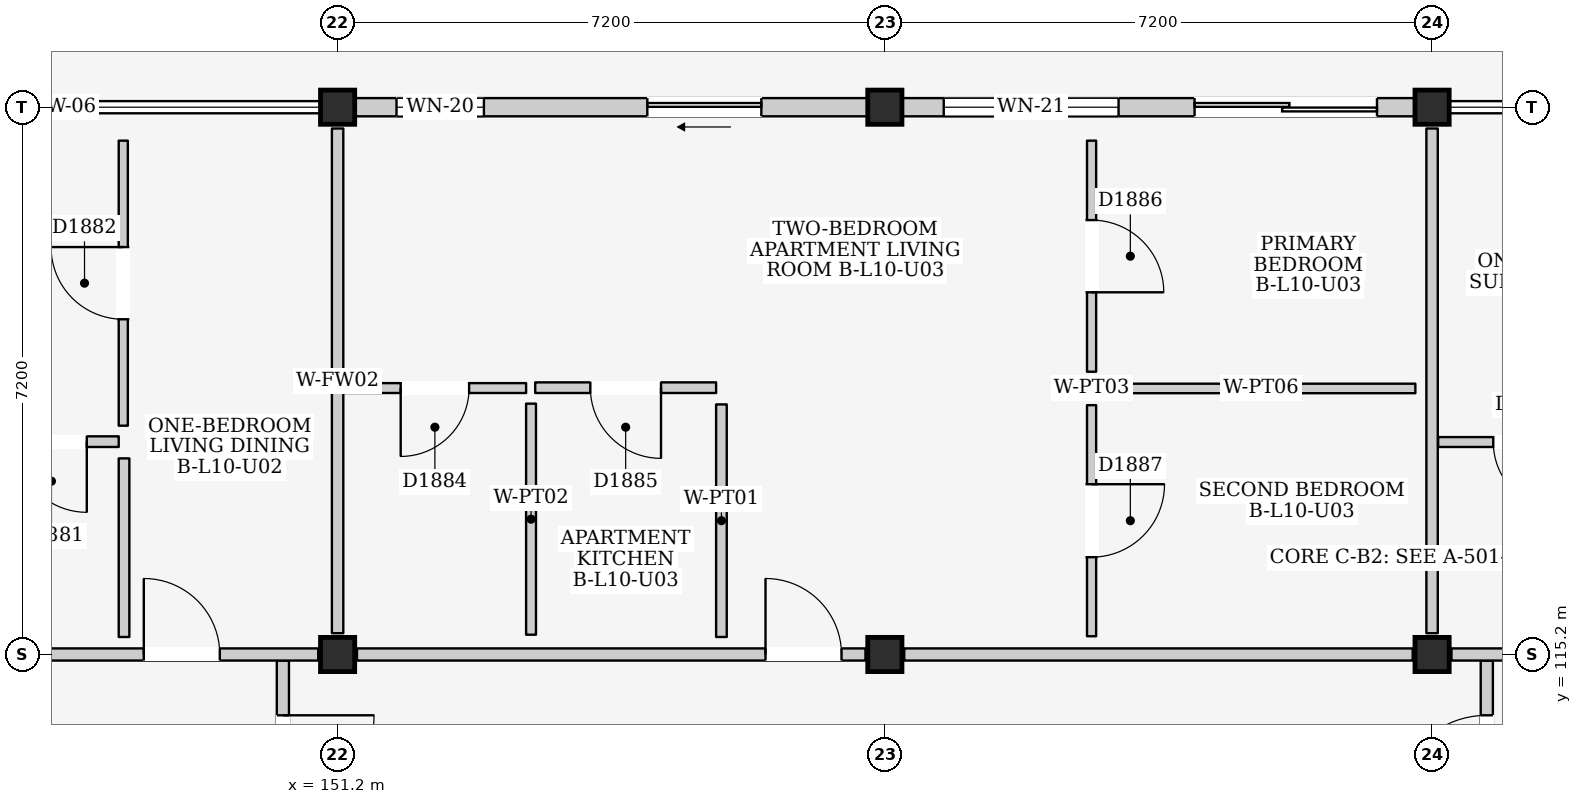
"""IFC4 building model, lengths in metres.
Left out: names, types, materials, properties, quantities, classifications, styles, units other than length and angle.
Written with IfcOpenShell. Run it as: python <this file> out.ifc"""

import sys

from ifc_helpers import new_model, si_unit, direction, frame, frame_2d, origin, origin_2d, place, context, subcontext, project, spatial, rectangle, extrude, element, fill, save


model = new_model("IFC4")
c1 = context("Model", 3, precision=1e-05, world=origin(), true_north=direction((0.0, 1.0)))
c2 = subcontext(c1, "Body", "Model", "MODEL_VIEW")
j1 = project(units=[si_unit("LENGTHUNIT", "METRE"), si_unit("PLANEANGLEUNIT", "RADIAN")], contexts=[c1])
p1 = place(None, origin())
s1 = spatial("IfcSite", under=j1, at=p1, CompositionType="ELEMENT")
p2 = place(p1, origin())
s2 = spatial("IfcBuilding", under=s1, at=p2, CompositionType="ELEMENT")
p3 = place(p2, frame((0.0, 0.0, 34.8)))
s3 = spatial("IfcBuildingStorey", under=s2, at=p3, CompositionType="ELEMENT", Elevation=34.8)
for number, where, z_axis, x_axis in (
    (1, (151.2, 115.2, 0.0), (0.0, 0.0, 1.0), (1.0, 0.0, 0.0)),
    (2, (151.2, 122.4, 0.0), (0.0, 0.0, 1.0), (1.0, 0.0, 0.0)),
    (3, (158.4, 115.2, 0.0), (0.0, 0.0, 1.0), (1.0, 0.0, 0.0)),
    (4, (158.4, 122.4, 0.0), (0.0, 0.0, 1.0), (1.0, 0.0, 0.0)),
    (5, (165.6, 115.2, 0.0), (0.0, 0.0, 1.0), (1.0, 0.0, 0.0)),
    (6, (165.6, 122.4, 0.0), (0.0, 0.0, 1.0), (1.0, 0.0, 0.0)),
):
    element("IfcColumn", number, at=place(p3, frame(where, z_axis=z_axis, x_axis=x_axis)), inside=s3, PredefinedType="COLUMN", context=c2, shape_type="SweptSolid", body=[
        extrude(rectangle(XDim=0.45, YDim=0.45, at=origin_2d()), origin(), (0.0, 0.0, 1.0), 3.2),
    ])
p4 = place(p3, frame((151.425, 122.4, 0.0), z_axis=(0.0, 0.0, 1.0), x_axis=(1.0, 0.0, 0.0)))
e7 = element("IfcWall", 7, at=p4, inside=s3, PredefinedType="ELEMENTEDWALL", context=c2, shape_type="SweptSolid", body=[
    extrude(rectangle(XDim=6.75, YDim=0.24, at=frame_2d((3.375, 0.0))), origin(), (0.0, 0.0, 1.0), 2.495),
])
p5 = place(p4, frame((3.85, 0.0, 0.0)))
e8 = element("IfcOpeningElement", 8, at=p5, cuts=e7, PredefinedType="OPENING", context=c2, shape_type="SweptSolid", body=[
    extrude(rectangle(XDim=1.5, YDim=2.12, at=frame_2d((0.75, 1.06))), frame((0.0, 0.135, 0.0), z_axis=(0.0, -1.0, 0.0), x_axis=(1.0, 0.0, 0.0)), (0.0, 0.0, 1.0), 0.27),
])
p6 = place(p4, frame((0.55, 0.0, 0.9)))
e9 = element("IfcOpeningElement", 9, at=p6, cuts=e7, PredefinedType="OPENING", context=c2, shape_type="SweptSolid", body=[
    extrude(rectangle(XDim=1.15, YDim=1.15, at=frame_2d((0.575, 0.575))), frame((0.0, 0.135, 0.0), z_axis=(0.0, -1.0, 0.0), x_axis=(1.0, 0.0, 0.0)), (0.0, 0.0, 1.0), 0.27),
])
p7 = place(p3, frame((158.625, 122.4, 0.0), z_axis=(0.0, 0.0, 1.0), x_axis=(1.0, 0.0, 0.0)))
e10 = element("IfcWall", 10, at=p7, inside=s3, PredefinedType="ELEMENTEDWALL", context=c2, shape_type="SweptSolid", body=[
    extrude(rectangle(XDim=6.75, YDim=0.24, at=frame_2d((3.375, 0.0))), origin(), (0.0, 0.0, 1.0), 2.495),
])
p8 = place(p7, frame((3.85, 0.0, 0.0)))
e11 = element("IfcOpeningElement", 11, at=p8, cuts=e10, PredefinedType="OPENING", context=c2, shape_type="SweptSolid", body=[
    extrude(rectangle(XDim=2.4, YDim=2.12, at=frame_2d((1.2, 1.06))), frame((0.0, 0.135, 0.0), z_axis=(0.0, -1.0, 0.0), x_axis=(1.0, 0.0, 0.0)), (0.0, 0.0, 1.0), 0.27),
])
p9 = place(p7, frame((0.55, 0.0, 0.785)))
e12 = element("IfcOpeningElement", 12, at=p9, cuts=e10, PredefinedType="OPENING", context=c2, shape_type="SweptSolid", body=[
    extrude(rectangle(XDim=2.3, YDim=1.6, at=frame_2d((1.15, 0.8))), frame((0.0, 0.135, 0.0), z_axis=(0.0, -1.0, 0.0), x_axis=(1.0, 0.0, 0.0)), (0.0, 0.0, 1.0), 0.27),
])
p10 = place(p3, frame((150.48, 111.1, 0.0), z_axis=(0.0, 0.0, 1.0), x_axis=(0.0, 1.0, 0.0)))
e13 = element("IfcWall", 13, at=p10, inside=s3, PredefinedType="PARTITIONING", context=c2, shape_type="SweptSolid", body=[
    extrude(rectangle(XDim=4.02, YDim=0.16, at=frame_2d((2.01, 0.0))), origin(), (0.0, 0.0, 1.0), 2.96),
])
p11 = place(p10, frame((2.1, 0.0, 0.0)))
e14 = element("IfcOpeningElement", 14, at=p11, cuts=e13, PredefinedType="OPENING", context=c2, shape_type="SweptSolid", body=[
    extrude(rectangle(XDim=1.2, YDim=2.2, at=frame_2d((0.6, 1.1))), frame((0.0, 0.095, 0.0), z_axis=(0.0, -1.0, 0.0), x_axis=(1.0, 0.0, 0.0)), (0.0, 0.0, 1.0), 0.19),
])
p12 = place(p3, frame((166.32, 110.8, 0.0), z_axis=(0.0, 0.0, 1.0), x_axis=(0.0, 1.0, 0.0)))
e15 = element("IfcWall", 15, at=p12, inside=s3, PredefinedType="PARTITIONING", context=c2, shape_type="SweptSolid", body=[
    extrude(rectangle(XDim=4.32, YDim=0.16, at=frame_2d((2.16, 0.0))), origin(), (0.0, 0.0, 1.0), 2.96),
])
p13 = place(p12, frame((2.4, 0.0, 0.0)))
e16 = element("IfcOpeningElement", 16, at=p13, cuts=e15, PredefinedType="OPENING", context=c2, shape_type="SweptSolid", body=[
    extrude(rectangle(XDim=1.2, YDim=2.2, at=frame_2d((0.6, 1.1))), frame((0.0, 0.095, 0.0), z_axis=(0.0, -1.0, 0.0), x_axis=(1.0, 0.0, 0.0)), (0.0, 0.0, 1.0), 0.19),
])
p14 = place(p3, frame((144.255, 115.2, 0.0), z_axis=(0.0, 0.0, 1.0), x_axis=(1.0, 0.0, 0.0)))
e17 = element("IfcWall", 17, at=p14, inside=s3, PredefinedType="PARTITIONING", context=c2, shape_type="SweptSolid", body=[
    extrude(rectangle(XDim=6.69, YDim=0.16, at=frame_2d((3.345, 0.0))), origin(), (0.0, 0.0, 1.0), 2.345),
])
p15 = place(p14, frame((4.395, 0.0, 0.0)))
e18 = element("IfcOpeningElement", 18, at=p15, cuts=e17, PredefinedType="OPENING", context=c2, shape_type="SweptSolid", body=[
    extrude(rectangle(XDim=1.0, YDim=2.15, at=frame_2d((0.5, 1.075))), frame((0.0, 0.095, 0.0), z_axis=(0.0, -1.0, 0.0), x_axis=(1.0, 0.0, 0.0)), (0.0, 0.0, 1.0), 0.19),
])
p16 = place(p3, frame((151.2, 115.48, 0.0), z_axis=(0.0, 0.0, 1.0), x_axis=(0.0, 1.0, 0.0)))
e19 = element("IfcWall", 19, at=p16, inside=s3, PredefinedType="PARTITIONING", context=c2, shape_type="SweptSolid", body=[
    extrude(rectangle(XDim=6.64, YDim=0.15, at=frame_2d((3.32, 0.0))), origin(), (0.0, 0.0, 1.0), 2.445),
])
p17 = place(p3, frame((146.55, 118.0, 0.0), z_axis=(0.0, 0.0, 1.0), x_axis=(1.0, 0.0, 0.0)))
e20 = element("IfcWall", 20, at=p17, inside=s3, PredefinedType="PARTITIONING", context=c2, shape_type="SweptSolid", body=[
    extrude(rectangle(XDim=1.77, YDim=0.14, at=frame_2d((0.885, 0.0))), origin(), (0.0, 0.0, 1.0), 2.96),
])
p18 = place(p17, frame((0.42, 0.0, 0.0)))
e21 = element("IfcOpeningElement", 21, at=p18, cuts=e20, PredefinedType="OPENING", context=c2, shape_type="SweptSolid", body=[
    extrude(rectangle(XDim=0.93, YDim=2.14, at=frame_2d((0.465, 1.07))), frame((0.0, 0.085, 0.0), z_axis=(0.0, -1.0, 0.0), x_axis=(1.0, 0.0, 0.0)), (0.0, 0.0, 1.0), 0.17),
])
p19 = place(p3, frame((148.39, 115.43, 0.0), z_axis=(0.0, 0.0, 1.0), x_axis=(0.0, 1.0, 0.0)))
e22 = element("IfcWall", 22, at=p19, inside=s3, PredefinedType="PARTITIONING", context=c2, shape_type="SweptSolid", body=[
    extrude(rectangle(XDim=2.35, YDim=0.14, at=frame_2d((1.175, 0.0))), origin(), (0.0, 0.0, 1.0), 2.96),
])
p20 = place(p3, frame((148.38, 118.21, 0.0), z_axis=(0.0, 0.0, 1.0), x_axis=(0.0, 1.0, 0.0)))
e23 = element("IfcWall", 23, at=p20, inside=s3, PredefinedType="PARTITIONING", context=c2, shape_type="SweptSolid", body=[
    extrude(rectangle(XDim=3.75, YDim=0.12, at=frame_2d((1.875, 0.0))), origin(), (0.0, 0.0, 1.0), 2.96),
])
p21 = place(p20, frame((1.4, 0.0, 0.0)))
e24 = element("IfcOpeningElement", 24, at=p21, cuts=e23, PredefinedType="OPENING", context=c2, shape_type="SweptSolid", body=[
    extrude(rectangle(XDim=0.95, YDim=2.15, at=frame_2d((0.475, 1.075))), frame((0.0, 0.075, 0.0), z_axis=(0.0, -1.0, 0.0), x_axis=(1.0, 0.0, 0.0)), (0.0, 0.0, 1.0), 0.15),
])
p22 = place(p3, frame((151.455, 115.2, 0.0), z_axis=(0.0, 0.0, 1.0), x_axis=(1.0, 0.0, 0.0)))
e25 = element("IfcWall", 25, at=p22, inside=s3, PredefinedType="PARTITIONING", context=c2, shape_type="SweptSolid", body=[
    extrude(rectangle(XDim=6.69, YDim=0.16, at=frame_2d((3.345, 0.0))), origin(), (0.0, 0.0, 1.0), 2.345),
])
p23 = place(p22, frame((5.375, 0.0, 0.0)))
e26 = element("IfcOpeningElement", 26, at=p23, cuts=e25, PredefinedType="OPENING", context=c2, shape_type="SweptSolid", body=[
    extrude(rectangle(XDim=1.0, YDim=2.15, at=frame_2d((0.5, 1.075))), frame((0.0, 0.095, 0.0), z_axis=(0.0, -1.0, 0.0), x_axis=(1.0, 0.0, 0.0)), (0.0, 0.0, 1.0), 0.19),
])
p24 = place(p3, frame((158.655, 115.2, 0.0), z_axis=(0.0, 0.0, 1.0), x_axis=(1.0, 0.0, 0.0)))
e27 = element("IfcWall", 27, at=p24, inside=s3, PredefinedType="PARTITIONING", context=c2, shape_type="SweptSolid", body=[
    extrude(rectangle(XDim=6.69, YDim=0.16, at=frame_2d((3.345, 0.0))), origin(), (0.0, 0.0, 1.0), 2.345),
])
p25 = place(p3, frame((165.6, 115.48, 0.0), z_axis=(0.0, 0.0, 1.0), x_axis=(0.0, 1.0, 0.0)))
e28 = element("IfcWall", 28, at=p25, inside=s3, PredefinedType="PARTITIONING", context=c2, shape_type="SweptSolid", body=[
    extrude(rectangle(XDim=6.64, YDim=0.15, at=frame_2d((3.32, 0.0))), origin(), (0.0, 0.0, 1.0), 2.445),
])
p26 = place(p3, frame((151.28, 118.705, 0.0), z_axis=(0.0, 0.0, 1.0), x_axis=(1.0, 0.0, 0.0)))
e29 = element("IfcWall", 29, at=p26, inside=s3, PredefinedType="PARTITIONING", context=c2, shape_type="SweptSolid", body=[
    extrude(rectangle(XDim=2.4, YDim=0.13, at=frame_2d((1.2, 0.0))), origin(), (0.0, 0.0, 1.0), 2.96),
])
p27 = place(p26, frame((0.75, 0.0, 0.0)))
e30 = element("IfcOpeningElement", 30, at=p27, cuts=e29, PredefinedType="OPENING", context=c2, shape_type="SweptSolid", body=[
    extrude(rectangle(XDim=0.9, YDim=2.1, at=frame_2d((0.45, 1.05))), frame((0.0, 0.08, 0.0), z_axis=(0.0, -1.0, 0.0), x_axis=(1.0, 0.0, 0.0)), (0.0, 0.0, 1.0), 0.16),
])
p28 = place(p3, frame((153.745, 115.46, 0.0), z_axis=(0.0, 0.0, 1.0), x_axis=(0.0, 1.0, 0.0)))
e31 = element("IfcWall", 31, at=p28, inside=s3, PredefinedType="PARTITIONING", context=c2, shape_type="SweptSolid", body=[
    extrude(rectangle(XDim=3.04, YDim=0.13, at=frame_2d((1.52, 0.0))), origin(), (0.0, 0.0, 1.0), 2.96),
])
p29 = place(p3, frame((153.8, 118.71, 0.0), z_axis=(0.0, 0.0, 1.0), x_axis=(1.0, 0.0, 0.0)))
e32 = element("IfcWall", 32, at=p29, inside=s3, PredefinedType="PARTITIONING", context=c2, shape_type="SweptSolid", body=[
    extrude(rectangle(XDim=2.38, YDim=0.14, at=frame_2d((1.19, 0.0))), origin(), (0.0, 0.0, 1.0), 2.96),
])
p30 = place(p29, frame((0.725, 0.0, 0.0)))
e33 = element("IfcOpeningElement", 33, at=p30, cuts=e32, PredefinedType="OPENING", context=c2, shape_type="SweptSolid", body=[
    extrude(rectangle(XDim=0.93, YDim=2.14, at=frame_2d((0.465, 1.07))), frame((0.0, 0.085, 0.0), z_axis=(0.0, -1.0, 0.0), x_axis=(1.0, 0.0, 0.0)), (0.0, 0.0, 1.0), 0.17),
])
p31 = place(p3, frame((156.25, 115.43, 0.0), z_axis=(0.0, 0.0, 1.0), x_axis=(0.0, 1.0, 0.0)))
e34 = element("IfcWall", 34, at=p31, inside=s3, PredefinedType="PARTITIONING", context=c2, shape_type="SweptSolid", body=[
    extrude(rectangle(XDim=3.06, YDim=0.14, at=frame_2d((1.53, 0.0))), origin(), (0.0, 0.0, 1.0), 2.96),
])
p32 = place(p3, frame((161.12, 118.92, 0.0), z_axis=(0.0, 0.0, 1.0), x_axis=(0.0, 1.0, 0.0)))
e35 = element("IfcWall", 35, at=p32, inside=s3, PredefinedType="PARTITIONING", context=c2, shape_type="SweptSolid", body=[
    extrude(rectangle(XDim=3.04, YDim=0.12, at=frame_2d((1.52, 0.0))), origin(), (0.0, 0.0, 1.0), 2.96),
])
p33 = place(p32, frame((1.045, 0.0, 0.0)))
e36 = element("IfcOpeningElement", 36, at=p33, cuts=e35, PredefinedType="OPENING", context=c2, shape_type="SweptSolid", body=[
    extrude(rectangle(XDim=0.95, YDim=2.15, at=frame_2d((0.475, 1.075))), frame((0.0, 0.075, 0.0), z_axis=(0.0, -1.0, 0.0), x_axis=(1.0, 0.0, 0.0)), (0.0, 0.0, 1.0), 0.15),
])
p34 = place(p3, frame((161.32, 118.7, 0.0), z_axis=(0.0, 0.0, 1.0), x_axis=(1.0, 0.0, 0.0)))
e37 = element("IfcWall", 37, at=p34, inside=s3, PredefinedType="PARTITIONING", context=c2, shape_type="SweptSolid", body=[
    extrude(rectangle(XDim=4.06, YDim=0.125, at=frame_2d((2.03, 0.0))), origin(), (0.0, 0.0, 1.0), 2.96),
])
p35 = place(p3, frame((161.12, 115.44, 0.0), z_axis=(0.0, 0.0, 1.0), x_axis=(0.0, 1.0, 0.0)))
e38 = element("IfcWall", 38, at=p35, inside=s3, PredefinedType="PARTITIONING", context=c2, shape_type="SweptSolid", body=[
    extrude(rectangle(XDim=3.04, YDim=0.12, at=frame_2d((1.52, 0.0))), origin(), (0.0, 0.0, 1.0), 2.96),
])
p36 = place(p35, frame((1.04, 0.0, 0.0)))
e39 = element("IfcOpeningElement", 39, at=p36, cuts=e38, PredefinedType="OPENING", context=c2, shape_type="SweptSolid", body=[
    extrude(rectangle(XDim=0.96, YDim=2.15, at=frame_2d((0.48, 1.075))), frame((0.0, 0.075, 0.0), z_axis=(0.0, -1.0, 0.0), x_axis=(1.0, 0.0, 0.0)), (0.0, 0.0, 1.0), 0.15),
])
p37 = place(p3, frame((165.855, 115.2, 0.0), z_axis=(0.0, 0.0, 1.0), x_axis=(1.0, 0.0, 0.0)))
e40 = element("IfcWall", 40, at=p37, inside=s3, PredefinedType="PARTITIONING", context=c2, shape_type="SweptSolid", body=[
    extrude(rectangle(XDim=6.69, YDim=0.16, at=frame_2d((3.345, 0.0))), origin(), (0.0, 0.0, 1.0), 2.345),
])
p38 = place(p37, frame((4.395, 0.0, 0.0)))
e41 = element("IfcOpeningElement", 41, at=p38, cuts=e40, PredefinedType="OPENING", context=c2, shape_type="SweptSolid", body=[
    extrude(rectangle(XDim=1.0, YDim=2.15, at=frame_2d((0.5, 1.075))), frame((0.0, 0.095, 0.0), z_axis=(0.0, -1.0, 0.0), x_axis=(1.0, 0.0, 0.0)), (0.0, 0.0, 1.0), 0.19),
])
p39 = place(p3, frame((165.68, 117.995, 0.0), z_axis=(0.0, 0.0, 1.0), x_axis=(1.0, 0.0, 0.0)))
e42 = element("IfcWall", 42, at=p39, inside=s3, PredefinedType="PARTITIONING", context=c2, shape_type="SweptSolid", body=[
    extrude(rectangle(XDim=2.35, YDim=0.13, at=frame_2d((1.175, 0.0))), origin(), (0.0, 0.0, 1.0), 2.96),
])
p40 = place(p39, frame((0.725, 0.0, 0.0)))
e43 = element("IfcOpeningElement", 43, at=p40, cuts=e42, PredefinedType="OPENING", context=c2, shape_type="SweptSolid", body=[
    extrude(rectangle(XDim=0.9, YDim=2.1, at=frame_2d((0.45, 1.05))), frame((0.0, 0.08, 0.0), z_axis=(0.0, -1.0, 0.0), x_axis=(1.0, 0.0, 0.0)), (0.0, 0.0, 1.0), 0.16),
])
p41 = place(p5, frame((1.5, 0.0, 0.0), z_axis=(0.0, 0.0, 1.0), x_axis=(-1.0, 0.0, 0.0)))
e44 = element("IfcDoor", 44, at=p41, inside=s3, OperationType="SLIDING_TO_LEFT", PredefinedType="DOOR", context=c2, shape_type="SweptSolid", body=[
    extrude(rectangle(XDim=1.5, YDim=2.12, at=frame_2d((0.75, 1.06))), frame((0.0, 0.025, 0.0), z_axis=(0.0, -1.0, 0.0), x_axis=(1.0, 0.0, 0.0)), (0.0, 0.0, 1.0), 0.05),
])
fill(e8, e44)
p42 = place(p6, origin())
e45 = element("IfcWindow", 45, at=p42, inside=s3, PartitioningType="SINGLE_PANEL", PredefinedType="WINDOW", context=c2, shape_type="SweptSolid", body=[
    extrude(rectangle(XDim=1.15, YDim=1.15, at=frame_2d((0.575, 0.575))), frame((0.0, 0.03, 0.0), z_axis=(0.0, -1.0, 0.0), x_axis=(1.0, 0.0, 0.0)), (0.0, 0.0, 1.0), 0.06),
])
fill(e9, e45)
p43 = place(p8, frame((2.4, 0.0, 0.0), z_axis=(0.0, 0.0, 1.0), x_axis=(-1.0, 0.0, 0.0)))
e46 = element("IfcDoor", 46, at=p43, inside=s3, OperationType="DOUBLE_DOOR_SLIDING", PredefinedType="DOOR", context=c2, shape_type="SweptSolid", body=[
    extrude(rectangle(XDim=2.4, YDim=2.12, at=frame_2d((1.2, 1.06))), frame((0.0, 0.025, 0.0), z_axis=(0.0, -1.0, 0.0), x_axis=(1.0, 0.0, 0.0)), (0.0, 0.0, 1.0), 0.05),
])
fill(e11, e46)
p44 = place(p9, origin())
e47 = element("IfcWindow", 47, at=p44, inside=s3, PartitioningType="TRIPLE_PANEL_VERTICAL", PredefinedType="WINDOW", context=c2, shape_type="SweptSolid", body=[
    extrude(rectangle(XDim=2.3, YDim=1.6, at=frame_2d((1.15, 0.8))), frame((0.0, 0.03, 0.0), z_axis=(0.0, -1.0, 0.0), x_axis=(1.0, 0.0, 0.0)), (0.0, 0.0, 1.0), 0.06),
])
fill(e12, e47)
p45 = place(p11, frame((1.2, 0.0, 0.0), z_axis=(0.0, 0.0, 1.0), x_axis=(-1.0, 0.0, 0.0)))
e48 = element("IfcDoor", 48, at=p45, inside=s3, OperationType="SINGLE_SWING_LEFT", PredefinedType="DOOR", context=c2, shape_type="SweptSolid", body=[
    extrude(rectangle(XDim=1.2, YDim=2.2, at=frame_2d((0.6, 1.1))), frame((0.0, 0.025, 0.0), z_axis=(0.0, -1.0, 0.0), x_axis=(1.0, 0.0, 0.0)), (0.0, 0.0, 1.0), 0.05),
])
fill(e14, e48)
p46 = place(p13, origin())
e49 = element("IfcDoor", 49, at=p46, inside=s3, OperationType="SINGLE_SWING_LEFT", PredefinedType="DOOR", context=c2, shape_type="SweptSolid", body=[
    extrude(rectangle(XDim=1.2, YDim=2.2, at=frame_2d((0.6, 1.1))), frame((0.0, 0.025, 0.0), z_axis=(0.0, -1.0, 0.0), x_axis=(1.0, 0.0, 0.0)), (0.0, 0.0, 1.0), 0.05),
])
fill(e16, e49)
p47 = place(p15, origin())
e50 = element("IfcDoor", 50, at=p47, inside=s3, OperationType="SINGLE_SWING_LEFT", PredefinedType="DOOR", context=c2, shape_type="SweptSolid", body=[
    extrude(rectangle(XDim=1.0, YDim=2.15, at=frame_2d((0.5, 1.075))), frame((0.0, 0.025, 0.0), z_axis=(0.0, -1.0, 0.0), x_axis=(1.0, 0.0, 0.0)), (0.0, 0.0, 1.0), 0.05),
])
fill(e18, e50)
p48 = place(p18, frame((0.93, 0.0, 0.0), z_axis=(0.0, 0.0, 1.0), x_axis=(-1.0, 0.0, 0.0)))
e51 = element("IfcDoor", 51, at=p48, inside=s3, OperationType="SINGLE_SWING_LEFT", PredefinedType="DOOR", context=c2, shape_type="SweptSolid", body=[
    extrude(rectangle(XDim=0.93, YDim=2.14, at=frame_2d((0.465, 1.07))), frame((0.0, 0.025, 0.0), z_axis=(0.0, -1.0, 0.0), x_axis=(1.0, 0.0, 0.0)), (0.0, 0.0, 1.0), 0.05),
])
fill(e21, e51)
p49 = place(p21, origin())
e52 = element("IfcDoor", 52, at=p49, inside=s3, OperationType="SINGLE_SWING_RIGHT", PredefinedType="DOOR", context=c2, shape_type="SweptSolid", body=[
    extrude(rectangle(XDim=0.95, YDim=2.15, at=frame_2d((0.475, 1.075))), frame((0.0, 0.025, 0.0), z_axis=(0.0, -1.0, 0.0), x_axis=(1.0, 0.0, 0.0)), (0.0, 0.0, 1.0), 0.05),
])
fill(e24, e52)
p50 = place(p23, origin())
e53 = element("IfcDoor", 53, at=p50, inside=s3, OperationType="SINGLE_SWING_LEFT", PredefinedType="DOOR", context=c2, shape_type="SweptSolid", body=[
    extrude(rectangle(XDim=1.0, YDim=2.15, at=frame_2d((0.5, 1.075))), frame((0.0, 0.025, 0.0), z_axis=(0.0, -1.0, 0.0), x_axis=(1.0, 0.0, 0.0)), (0.0, 0.0, 1.0), 0.05),
])
fill(e26, e53)
p51 = place(p27, frame((0.9, 0.0, 0.0), z_axis=(0.0, 0.0, 1.0), x_axis=(-1.0, 0.0, 0.0)))
e54 = element("IfcDoor", 54, at=p51, inside=s3, OperationType="SINGLE_SWING_RIGHT", PredefinedType="DOOR", context=c2, shape_type="SweptSolid", body=[
    extrude(rectangle(XDim=0.9, YDim=2.1, at=frame_2d((0.45, 1.05))), frame((0.0, 0.025, 0.0), z_axis=(0.0, -1.0, 0.0), x_axis=(1.0, 0.0, 0.0)), (0.0, 0.0, 1.0), 0.05),
])
fill(e30, e54)
p52 = place(p30, frame((0.93, 0.0, 0.0), z_axis=(0.0, 0.0, 1.0), x_axis=(-1.0, 0.0, 0.0)))
e55 = element("IfcDoor", 55, at=p52, inside=s3, OperationType="SINGLE_SWING_LEFT", PredefinedType="DOOR", context=c2, shape_type="SweptSolid", body=[
    extrude(rectangle(XDim=0.93, YDim=2.14, at=frame_2d((0.465, 1.07))), frame((0.0, 0.025, 0.0), z_axis=(0.0, -1.0, 0.0), x_axis=(1.0, 0.0, 0.0)), (0.0, 0.0, 1.0), 0.05),
])
fill(e33, e55)
p53 = place(p33, frame((0.95, 0.0, 0.0), z_axis=(0.0, 0.0, 1.0), x_axis=(-1.0, 0.0, 0.0)))
e56 = element("IfcDoor", 56, at=p53, inside=s3, OperationType="SINGLE_SWING_RIGHT", PredefinedType="DOOR", context=c2, shape_type="SweptSolid", body=[
    extrude(rectangle(XDim=0.95, YDim=2.15, at=frame_2d((0.475, 1.075))), frame((0.0, 0.025, 0.0), z_axis=(0.0, -1.0, 0.0), x_axis=(1.0, 0.0, 0.0)), (0.0, 0.0, 1.0), 0.05),
])
fill(e36, e56)
p54 = place(p36, frame((0.96, 0.0, 0.0), z_axis=(0.0, 0.0, 1.0), x_axis=(-1.0, 0.0, 0.0)))
e57 = element("IfcDoor", 57, at=p54, inside=s3, OperationType="SINGLE_SWING_LEFT", PredefinedType="DOOR", context=c2, shape_type="SweptSolid", body=[
    extrude(rectangle(XDim=0.96, YDim=2.15, at=frame_2d((0.48, 1.075))), frame((0.0, 0.025, 0.0), z_axis=(0.0, -1.0, 0.0), x_axis=(1.0, 0.0, 0.0)), (0.0, 0.0, 1.0), 0.05),
])
fill(e39, e57)
p55 = place(p40, frame((0.9, 0.0, 0.0), z_axis=(0.0, 0.0, 1.0), x_axis=(-1.0, 0.0, 0.0)))
e58 = element("IfcDoor", 58, at=p55, inside=s3, OperationType="SINGLE_SWING_LEFT", PredefinedType="DOOR", context=c2, shape_type="SweptSolid", body=[
    extrude(rectangle(XDim=0.9, YDim=2.1, at=frame_2d((0.45, 1.05))), frame((0.0, 0.025, 0.0), z_axis=(0.0, -1.0, 0.0), x_axis=(1.0, 0.0, 0.0)), (0.0, 0.0, 1.0), 0.05),
])
fill(e43, e58)
save(model, sys.argv[1])
